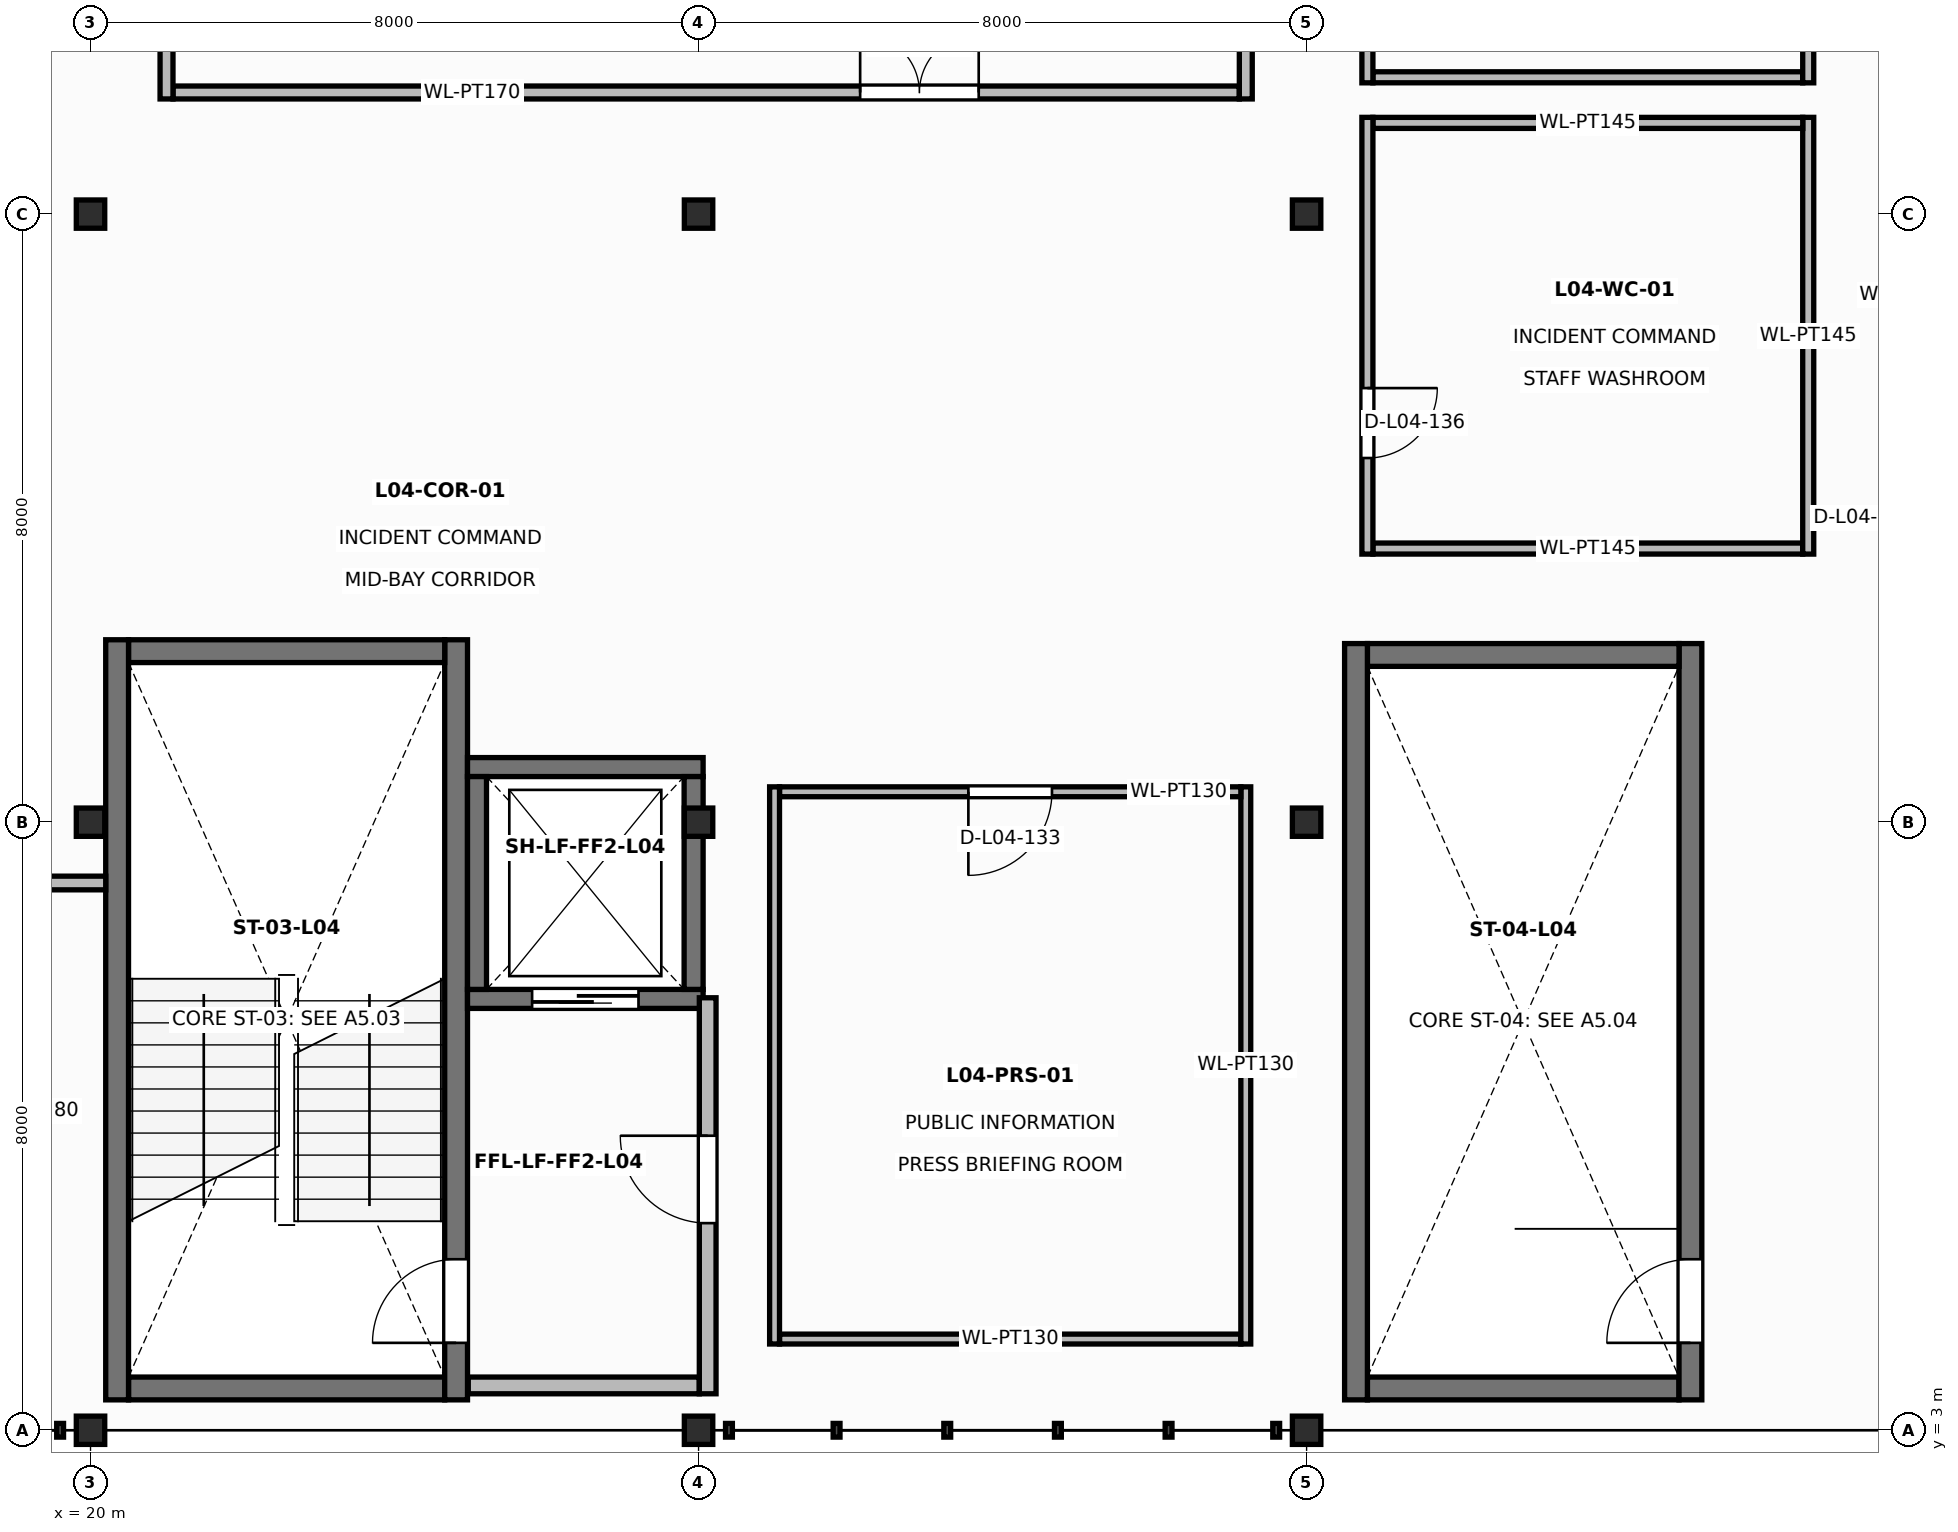
"""IFC4 building model, lengths in metres.
Left out: names, types, materials, properties, quantities, classifications, styles, units other than length and angle.
Written with IfcOpenShell. Run it as: python <this file> out.ifc"""

import sys

from ifc_helpers import new_model, si_unit, direction, frame, frame_2d, origin, origin_2d, place, context, subcontext, project, spatial, rectangle, i_section, extrude, element, fill, save


model = new_model("IFC4")
c1 = context("Model", 3, precision=1e-05, world=origin(), true_north=direction((0.0, 1.0)))
c2 = subcontext(c1, "Body", "Model", "MODEL_VIEW")
j1 = project(units=[si_unit("LENGTHUNIT", "METRE"), si_unit("PLANEANGLEUNIT", "RADIAN")], contexts=[c1])
p1 = place(None, origin())
s1 = spatial("IfcSite", under=j1, at=p1, CompositionType="ELEMENT")
p2 = place(p1, origin())
s2 = spatial("IfcBuilding", under=s1, at=p2, CompositionType="ELEMENT")
p3 = place(p2, frame((0.0, 0.0, 19.8)))
s3 = spatial("IfcBuildingStorey", under=s2, at=p3, CompositionType="ELEMENT", Elevation=19.8)
for number, where, z_axis, x_axis in (
    (1, (20.0, 3.0, 0.0), (0.0, 0.0, 1.0), (1.0, 0.0, 0.0)),
    (2, (20.0, 11.0, 0.0), (0.0, 0.0, 1.0), (1.0, 0.0, 0.0)),
    (3, (20.0, 19.0, 0.0), (0.0, 0.0, 1.0), (1.0, 0.0, 0.0)),
    (4, (28.0, 3.0, 0.0), (0.0, 0.0, 1.0), (1.0, 0.0, 0.0)),
    (5, (28.0, 11.0, 0.0), (0.0, 0.0, 1.0), (1.0, 0.0, 0.0)),
    (6, (28.0, 19.0, 0.0), (0.0, 0.0, 1.0), (1.0, 0.0, 0.0)),
    (7, (36.0, 3.0, 0.0), (0.0, 0.0, 1.0), (1.0, 0.0, 0.0)),
    (8, (36.0, 11.0, 0.0), (0.0, 0.0, 1.0), (1.0, 0.0, 0.0)),
    (9, (36.0, 19.0, 0.0), (0.0, 0.0, 1.0), (1.0, 0.0, 0.0)),
):
    element("IfcColumn", number, at=place(p3, frame(where, z_axis=z_axis, x_axis=x_axis)), inside=s3, PredefinedType="COLUMN", context=c2, shape_type="SweptSolid", body=[
        extrude(i_section(OverallWidth=0.374, OverallDepth=0.372, WebThickness=0.016, FlangeThickness=0.026, at=origin_2d()), origin(), (0.0, 0.0, 1.0), 4.2),
    ])
p4 = place(p3, frame((20.5, 3.55, 0.0), z_axis=(0.0, 0.0, 1.0), x_axis=(1.0, 0.0, 0.0)))
e10 = element("IfcWall", 10, at=p4, inside=s3, PredefinedType="SHEAR", context=c2, shape_type="SweptSolid", body=[
    extrude(rectangle(XDim=4.16, YDim=0.3, at=frame_2d((2.08, 0.0))), origin(), (0.0, 0.0, 1.0), 3.98),
])
p5 = place(p3, frame((24.81, 3.4, 0.0), z_axis=(0.0, 0.0, 1.0), x_axis=(0.0, 1.0, 0.0)))
e11 = element("IfcWall", 11, at=p5, inside=s3, PredefinedType="SHEAR", context=c2, shape_type="SweptSolid", body=[
    extrude(rectangle(XDim=10.0, YDim=0.3, at=frame_2d((5.0, 0.0))), origin(), (0.0, 0.0, 1.0), 3.98),
])
p6 = place(p5, frame((0.75, 0.0, 0.0)))
e12 = element("IfcOpeningElement", 12, at=p6, cuts=e11, PredefinedType="OPENING", context=c2, shape_type="SweptSolid", body=[
    extrude(rectangle(XDim=1.1, YDim=2.15, at=frame_2d((0.55, 1.075))), frame((0.0, 0.16, 0.0), z_axis=(0.0, -1.0, 0.0), x_axis=(1.0, 0.0, 0.0)), (0.0, 0.0, 1.0), 0.32),
])
p7 = place(p3, frame((24.66, 13.25, 0.0), z_axis=(0.0, 0.0, 1.0), x_axis=(-1.0, 0.0, 0.0)))
e13 = element("IfcWall", 13, at=p7, inside=s3, PredefinedType="SHEAR", context=c2, shape_type="SweptSolid", body=[
    extrude(rectangle(XDim=4.16, YDim=0.3, at=frame_2d((2.08, 0.0))), origin(), (0.0, 0.0, 1.0), 3.98),
])
p8 = place(p3, frame((20.35, 13.4, 0.0), z_axis=(0.0, 0.0, 1.0), x_axis=(0.0, -1.0, 0.0)))
e14 = element("IfcWall", 14, at=p8, inside=s3, PredefinedType="SHEAR", context=c2, shape_type="SweptSolid", body=[
    extrude(rectangle(XDim=10.0, YDim=0.3, at=frame_2d((5.0, 0.0))), origin(), (0.0, 0.0, 1.0), 3.98),
])
p9 = place(p3, frame((36.8, 3.55, 0.0), z_axis=(0.0, 0.0, 1.0), x_axis=(1.0, 0.0, 0.0)))
e15 = element("IfcWall", 15, at=p9, inside=s3, PredefinedType="SHEAR", context=c2, shape_type="SweptSolid", body=[
    extrude(rectangle(XDim=4.1, YDim=0.3, at=frame_2d((2.05, 0.0))), origin(), (0.0, 0.0, 1.0), 3.98),
])
p10 = place(p3, frame((41.05, 3.4, 0.0), z_axis=(0.0, 0.0, 1.0), x_axis=(0.0, 1.0, 0.0)))
e16 = element("IfcWall", 16, at=p10, inside=s3, PredefinedType="SHEAR", context=c2, shape_type="SweptSolid", body=[
    extrude(rectangle(XDim=9.95, YDim=0.3, at=frame_2d((4.975, 0.0))), origin(), (0.0, 0.0, 1.0), 3.98),
])
p11 = place(p10, frame((0.75, 0.0, 0.0)))
e17 = element("IfcOpeningElement", 17, at=p11, cuts=e16, PredefinedType="OPENING", context=c2, shape_type="SweptSolid", body=[
    extrude(rectangle(XDim=1.1, YDim=2.15, at=frame_2d((0.55, 1.075))), frame((0.0, 0.16, 0.0), z_axis=(0.0, -1.0, 0.0), x_axis=(1.0, 0.0, 0.0)), (0.0, 0.0, 1.0), 0.32),
])
p12 = place(p3, frame((40.9, 13.2, 0.0), z_axis=(0.0, 0.0, 1.0), x_axis=(-1.0, 0.0, 0.0)))
e18 = element("IfcWall", 18, at=p12, inside=s3, PredefinedType="SHEAR", context=c2, shape_type="SweptSolid", body=[
    extrude(rectangle(XDim=4.1, YDim=0.3, at=frame_2d((2.05, 0.0))), origin(), (0.0, 0.0, 1.0), 3.98),
])
p13 = place(p3, frame((36.65, 13.35, 0.0), z_axis=(0.0, 0.0, 1.0), x_axis=(0.0, -1.0, 0.0)))
e19 = element("IfcWall", 19, at=p13, inside=s3, PredefinedType="SHEAR", context=c2, shape_type="SweptSolid", body=[
    extrude(rectangle(XDim=9.95, YDim=0.3, at=frame_2d((4.975, 0.0))), origin(), (0.0, 0.0, 1.0), 3.98),
])
p14 = place(p3, frame((24.96, 8.675, 0.0), z_axis=(0.0, 0.0, 1.0), x_axis=(1.0, 0.0, 0.0)))
e20 = element("IfcWall", 20, at=p14, inside=s3, PredefinedType="SOLIDWALL", context=c2, shape_type="SweptSolid", body=[
    extrude(rectangle(XDim=3.1, YDim=0.25, at=frame_2d((1.55, 0.0))), origin(), (0.0, 0.0, 1.0), 3.98),
])
p15 = place(p14, frame((0.85, 0.0, 0.0)))
e21 = element("IfcOpeningElement", 21, at=p15, cuts=e20, PredefinedType="OPENING", context=c2, shape_type="SweptSolid", body=[
    extrude(rectangle(XDim=1.4, YDim=2.25, at=frame_2d((0.7, 1.125))), frame((0.0, 0.135, 0.0), z_axis=(0.0, -1.0, 0.0), x_axis=(1.0, 0.0, 0.0)), (0.0, 0.0, 1.0), 0.27),
])
p16 = place(p3, frame((28.06, 11.725, 0.0), z_axis=(0.0, 0.0, 1.0), x_axis=(-1.0, 0.0, 0.0)))
e22 = element("IfcWall", 22, at=p16, inside=s3, PredefinedType="SOLIDWALL", context=c2, shape_type="SweptSolid", body=[
    extrude(rectangle(XDim=3.1, YDim=0.25, at=frame_2d((1.55, 0.0))), origin(), (0.0, 0.0, 1.0), 3.98),
])
for number, where, z_axis, x_axis in (
    (23, (27.935, 8.8, 0.0), (0.0, 0.0, 1.0), (0.0, 1.0, 0.0)),
    (24, (25.085, 11.6, 0.0), (0.0, 0.0, 1.0), (0.0, -1.0, 0.0)),
):
    element("IfcWall", number, at=place(p3, frame(where, z_axis=z_axis, x_axis=x_axis)), inside=s3, PredefinedType="SOLIDWALL", context=c2, shape_type="SweptSolid", body=[
        extrude(rectangle(XDim=2.8, YDim=0.25, at=frame_2d((1.4, 0.0))), origin(), (0.0, 0.0, 1.0), 3.98),
    ])
p17 = place(p3, frame((24.97, 3.59, 0.0), z_axis=(0.0, 0.0, 1.0), x_axis=(1.0, 0.0, 0.0)))
e25 = element("IfcWall", 25, at=p17, inside=s3, PredefinedType="SOLIDWALL", context=c2, shape_type="SweptSolid", body=[
    extrude(rectangle(XDim=3.04, YDim=0.22, at=frame_2d((1.52, 0.0))), origin(), (0.0, 0.0, 1.0), 3.98),
])
p18 = place(p3, frame((28.12, 3.48, 0.0), z_axis=(0.0, 0.0, 1.0), x_axis=(0.0, 1.0, 0.0)))
e26 = element("IfcWall", 26, at=p18, inside=s3, PredefinedType="SOLIDWALL", context=c2, shape_type="SweptSolid", body=[
    extrude(rectangle(XDim=5.21, YDim=0.22, at=frame_2d((2.605, 0.0))), origin(), (0.0, 0.0, 1.0), 3.364),
])
p19 = place(p18, frame((2.245, 0.0, 0.0)))
e27 = element("IfcOpeningElement", 27, at=p19, cuts=e26, PredefinedType="OPENING", context=c2, shape_type="SweptSolid", body=[
    extrude(rectangle(XDim=1.15, YDim=2.15, at=frame_2d((0.575, 1.075))), frame((0.0, 0.12, 0.0), z_axis=(0.0, -1.0, 0.0), x_axis=(1.0, 0.0, 0.0)), (0.0, 0.0, 1.0), 0.24),
])
p20 = place(p3, frame((19.29, 10.2, 0.0), z_axis=(0.0, 0.0, 1.0), x_axis=(1.0, 0.0, 0.0)))
e28 = element("IfcWall", 28, at=p20, inside=s3, PredefinedType="PARTITIONING", context=c2, shape_type="SweptSolid", body=[
    extrude(rectangle(XDim=0.91, YDim=0.18, at=frame_2d((0.455, 0.0))), origin(), (0.0, 0.0, 1.0), 3.364),
])
p21 = place(p3, frame((21.085, 20.6, 0.0), z_axis=(0.0, 0.0, 1.0), x_axis=(1.0, 0.0, 0.0)))
e29 = element("IfcWall", 29, at=p21, inside=s3, PredefinedType="PARTITIONING", context=c2, shape_type="SweptSolid", body=[
    extrude(rectangle(XDim=14.03, YDim=0.17, at=frame_2d((7.015, 0.0))), origin(), (0.0, 0.0, 1.0), 3.364),
])
p22 = place(p21, frame((9.041, 0.0, 0.0)))
e30 = element("IfcOpeningElement", 30, at=p22, cuts=e29, PredefinedType="OPENING", context=c2, shape_type="SweptSolid", body=[
    extrude(rectangle(XDim=1.56, YDim=2.22, at=frame_2d((0.78, 1.11))), frame((0.0, 0.095, 0.0), z_axis=(0.0, -1.0, 0.0), x_axis=(1.0, 0.0, 0.0)), (0.0, 0.0, 1.0), 0.19),
])
for number, where, z_axis, x_axis in (
    (31, (35.2, 20.515, 0.0), (0.0, 0.0, 1.0), (0.0, 1.0, 0.0)),
    (32, (21.0, 33.885, 0.0), (0.0, 0.0, 1.0), (0.0, -1.0, 0.0)),
):
    element("IfcWall", number, at=place(p3, frame(where, z_axis=z_axis, x_axis=x_axis)), inside=s3, PredefinedType="PARTITIONING", context=c2, shape_type="SweptSolid", body=[
        extrude(rectangle(XDim=13.37, YDim=0.17, at=frame_2d((6.685, 0.0))), origin(), (0.0, 0.0, 1.0), 3.2),
    ])
p23 = place(p3, frame((29.065, 4.2, 0.0), z_axis=(0.0, 0.0, 1.0), x_axis=(1.0, 0.0, 0.0)))
e33 = element("IfcWall", 33, at=p23, inside=s3, PredefinedType="PARTITIONING", context=c2, shape_type="SweptSolid", body=[
    extrude(rectangle(XDim=6.07, YDim=0.13, at=frame_2d((3.035, 0.0))), origin(), (0.0, 0.0, 1.0), 3.98),
])
p24 = place(p3, frame((35.2, 4.135, 0.0), z_axis=(0.0, 0.0, 1.0), x_axis=(0.0, 1.0, 0.0)))
e34 = element("IfcWall", 34, at=p24, inside=s3, PredefinedType="PARTITIONING", context=c2, shape_type="SweptSolid", body=[
    extrude(rectangle(XDim=7.33, YDim=0.13, at=frame_2d((3.665, 0.0))), origin(), (0.0, 0.0, 1.0), 3.2),
])
p25 = place(p3, frame((35.135, 11.4, 0.0), z_axis=(0.0, 0.0, 1.0), x_axis=(-1.0, 0.0, 0.0)))
e35 = element("IfcWall", 35, at=p25, inside=s3, PredefinedType="PARTITIONING", context=c2, shape_type="SweptSolid", body=[
    extrude(rectangle(XDim=6.07, YDim=0.13, at=frame_2d((3.035, 0.0))), origin(), (0.0, 0.0, 1.0), 3.98),
])
p26 = place(p25, frame((2.485, 0.0, 0.0)))
e36 = element("IfcOpeningElement", 36, at=p26, cuts=e35, PredefinedType="OPENING", context=c2, shape_type="SweptSolid", body=[
    extrude(rectangle(XDim=1.1, YDim=2.18, at=frame_2d((0.55, 1.09))), frame((0.0, 0.075, 0.0), z_axis=(0.0, -1.0, 0.0), x_axis=(1.0, 0.0, 0.0)), (0.0, 0.0, 1.0), 0.15),
])
p27 = place(p3, frame((29.0, 11.465, 0.0), z_axis=(0.0, 0.0, 1.0), x_axis=(0.0, -1.0, 0.0)))
e37 = element("IfcWall", 37, at=p27, inside=s3, PredefinedType="PARTITIONING", context=c2, shape_type="SweptSolid", body=[
    extrude(rectangle(XDim=7.33, YDim=0.13, at=frame_2d((3.665, 0.0))), origin(), (0.0, 0.0, 1.0), 3.2),
])
p28 = place(p3, frame((36.872, 14.6, 0.0), z_axis=(0.0, 0.0, 1.0), x_axis=(1.0, 0.0, 0.0)))
e38 = element("IfcWall", 38, at=p28, inside=s3, PredefinedType="PARTITIONING", context=c2, shape_type="SweptSolid", body=[
    extrude(rectangle(XDim=5.656, YDim=0.145, at=frame_2d((2.828, 0.0))), origin(), (0.0, 0.0, 1.0), 3.98),
])
p29 = place(p3, frame((42.6, 14.527, 0.0), z_axis=(0.0, 0.0, 1.0), x_axis=(0.0, 1.0, 0.0)))
e39 = element("IfcWall", 39, at=p29, inside=s3, PredefinedType="PARTITIONING", context=c2, shape_type="SweptSolid", body=[
    extrude(rectangle(XDim=5.746, YDim=0.145, at=frame_2d((2.873, 0.0))), origin(), (0.0, 0.0, 1.0), 3.98),
])
p30 = place(p3, frame((42.528, 20.2, 0.0), z_axis=(0.0, 0.0, 1.0), x_axis=(-1.0, 0.0, 0.0)))
e40 = element("IfcWall", 40, at=p30, inside=s3, PredefinedType="PARTITIONING", context=c2, shape_type="SweptSolid", body=[
    extrude(rectangle(XDim=5.656, YDim=0.145, at=frame_2d((2.828, 0.0))), origin(), (0.0, 0.0, 1.0), 3.98),
])
p31 = place(p3, frame((36.8, 20.273, 0.0), z_axis=(0.0, 0.0, 1.0), x_axis=(0.0, -1.0, 0.0)))
e41 = element("IfcWall", 41, at=p31, inside=s3, PredefinedType="PARTITIONING", context=c2, shape_type="SweptSolid", body=[
    extrude(rectangle(XDim=5.746, YDim=0.145, at=frame_2d((2.873, 0.0))), origin(), (0.0, 0.0, 1.0), 3.98),
])
p32 = place(p31, frame((3.562, 0.0, 0.0)))
e42 = element("IfcOpeningElement", 42, at=p32, cuts=e41, PredefinedType="OPENING", context=c2, shape_type="SweptSolid", body=[
    extrude(rectangle(XDim=0.92, YDim=2.1, at=frame_2d((0.46, 1.05))), frame((0.0, 0.083, 0.0), z_axis=(0.0, -1.0, 0.0), x_axis=(1.0, 0.0, 0.0)), (0.0, 0.0, 1.0), 0.165),
])
p33 = place(p3, frame((36.872, 20.8, 0.0), z_axis=(0.0, 0.0, 1.0), x_axis=(1.0, 0.0, 0.0)))
e43 = element("IfcWall", 43, at=p33, inside=s3, PredefinedType="PARTITIONING", context=c2, shape_type="SweptSolid", body=[
    extrude(rectangle(XDim=5.656, YDim=0.145, at=frame_2d((2.828, 0.0))), origin(), (0.0, 0.0, 1.0), 3.98),
])
p34 = place(p3, frame((42.6, 20.727, 0.0), z_axis=(0.0, 0.0, 1.0), x_axis=(0.0, 1.0, 0.0)))
e44 = element("IfcWall", 44, at=p34, inside=s3, PredefinedType="PARTITIONING", context=c2, shape_type="SweptSolid", body=[
    extrude(rectangle(XDim=4.146, YDim=0.145, at=frame_2d((2.073, 0.0))), origin(), (0.0, 0.0, 1.0), 3.98),
])
p35 = place(p3, frame((36.8, 24.873, 0.0), z_axis=(0.0, 0.0, 1.0), x_axis=(0.0, -1.0, 0.0)))
e45 = element("IfcWall", 45, at=p35, inside=s3, PredefinedType="PARTITIONING", context=c2, shape_type="SweptSolid", body=[
    extrude(rectangle(XDim=4.146, YDim=0.145, at=frame_2d((2.073, 0.0))), origin(), (0.0, 0.0, 1.0), 3.98),
])
p36 = place(p35, frame((1.593, 0.0, 0.0)))
e46 = element("IfcOpeningElement", 46, at=p36, cuts=e45, PredefinedType="OPENING", context=c2, shape_type="SweptSolid", body=[
    extrude(rectangle(XDim=0.96, YDim=2.12, at=frame_2d((0.48, 1.06))), frame((0.0, 0.083, 0.0), z_axis=(0.0, -1.0, 0.0), x_axis=(1.0, 0.0, 0.0)), (0.0, 0.0, 1.0), 0.165),
])
p37 = place(p6, origin())
e47 = element("IfcDoor", 47, at=p37, inside=s3, OperationType="SINGLE_SWING_LEFT", PredefinedType="DOOR", context=c2, shape_type="SweptSolid", body=[
    extrude(rectangle(XDim=1.1, YDim=2.15, at=frame_2d((0.55, 1.075))), frame((0.0, 0.025, 0.0), z_axis=(0.0, -1.0, 0.0), x_axis=(1.0, 0.0, 0.0)), (0.0, 0.0, 1.0), 0.05),
])
fill(e12, e47)
p38 = place(p11, origin())
e48 = element("IfcDoor", 48, at=p38, inside=s3, OperationType="SINGLE_SWING_LEFT", PredefinedType="DOOR", context=c2, shape_type="SweptSolid", body=[
    extrude(rectangle(XDim=1.1, YDim=2.15, at=frame_2d((0.55, 1.075))), frame((0.0, 0.025, 0.0), z_axis=(0.0, -1.0, 0.0), x_axis=(1.0, 0.0, 0.0)), (0.0, 0.0, 1.0), 0.05),
])
fill(e17, e48)
p39 = place(p15, frame((1.4, 0.0, 0.0), z_axis=(0.0, 0.0, 1.0), x_axis=(-1.0, 0.0, 0.0)))
e49 = element("IfcDoor", 49, at=p39, inside=s3, OperationType="DOUBLE_DOOR_SLIDING", PredefinedType="DOOR", context=c2, shape_type="SweptSolid", body=[
    extrude(rectangle(XDim=1.4, YDim=2.25, at=frame_2d((0.7, 1.125))), frame((0.0, 0.025, 0.0), z_axis=(0.0, -1.0, 0.0), x_axis=(1.0, 0.0, 0.0)), (0.0, 0.0, 1.0), 0.05),
])
fill(e21, e49)
p40 = place(p19, origin())
e50 = element("IfcDoor", 50, at=p40, inside=s3, OperationType="SINGLE_SWING_RIGHT", PredefinedType="DOOR", context=c2, shape_type="SweptSolid", body=[
    extrude(rectangle(XDim=1.15, YDim=2.15, at=frame_2d((0.575, 1.075))), frame((0.0, 0.025, 0.0), z_axis=(0.0, -1.0, 0.0), x_axis=(1.0, 0.0, 0.0)), (0.0, 0.0, 1.0), 0.05),
])
fill(e27, e50)
p41 = place(p22, origin())
e51 = element("IfcDoor", 51, at=p41, inside=s3, OperationType="DOUBLE_DOOR_SINGLE_SWING", PredefinedType="DOOR", context=c2, shape_type="SweptSolid", body=[
    extrude(rectangle(XDim=1.56, YDim=2.22, at=frame_2d((0.78, 1.11))), frame((0.0, 0.025, 0.0), z_axis=(0.0, -1.0, 0.0), x_axis=(1.0, 0.0, 0.0)), (0.0, 0.0, 1.0), 0.05),
])
fill(e30, e51)
p42 = place(p26, origin())
e52 = element("IfcDoor", 52, at=p42, inside=s3, OperationType="SINGLE_SWING_RIGHT", PredefinedType="DOOR", context=c2, shape_type="SweptSolid", body=[
    extrude(rectangle(XDim=1.1, YDim=2.18, at=frame_2d((0.55, 1.09))), frame((0.0, 0.025, 0.0), z_axis=(0.0, -1.0, 0.0), x_axis=(1.0, 0.0, 0.0)), (0.0, 0.0, 1.0), 0.05),
])
fill(e36, e52)
p43 = place(p32, origin())
e53 = element("IfcDoor", 53, at=p43, inside=s3, OperationType="SINGLE_SWING_LEFT", PredefinedType="DOOR", context=c2, shape_type="SweptSolid", body=[
    extrude(rectangle(XDim=0.92, YDim=2.1, at=frame_2d((0.46, 1.05))), frame((0.0, 0.025, 0.0), z_axis=(0.0, -1.0, 0.0), x_axis=(1.0, 0.0, 0.0)), (0.0, 0.0, 1.0), 0.05),
])
fill(e42, e53)
save(model, sys.argv[1])
